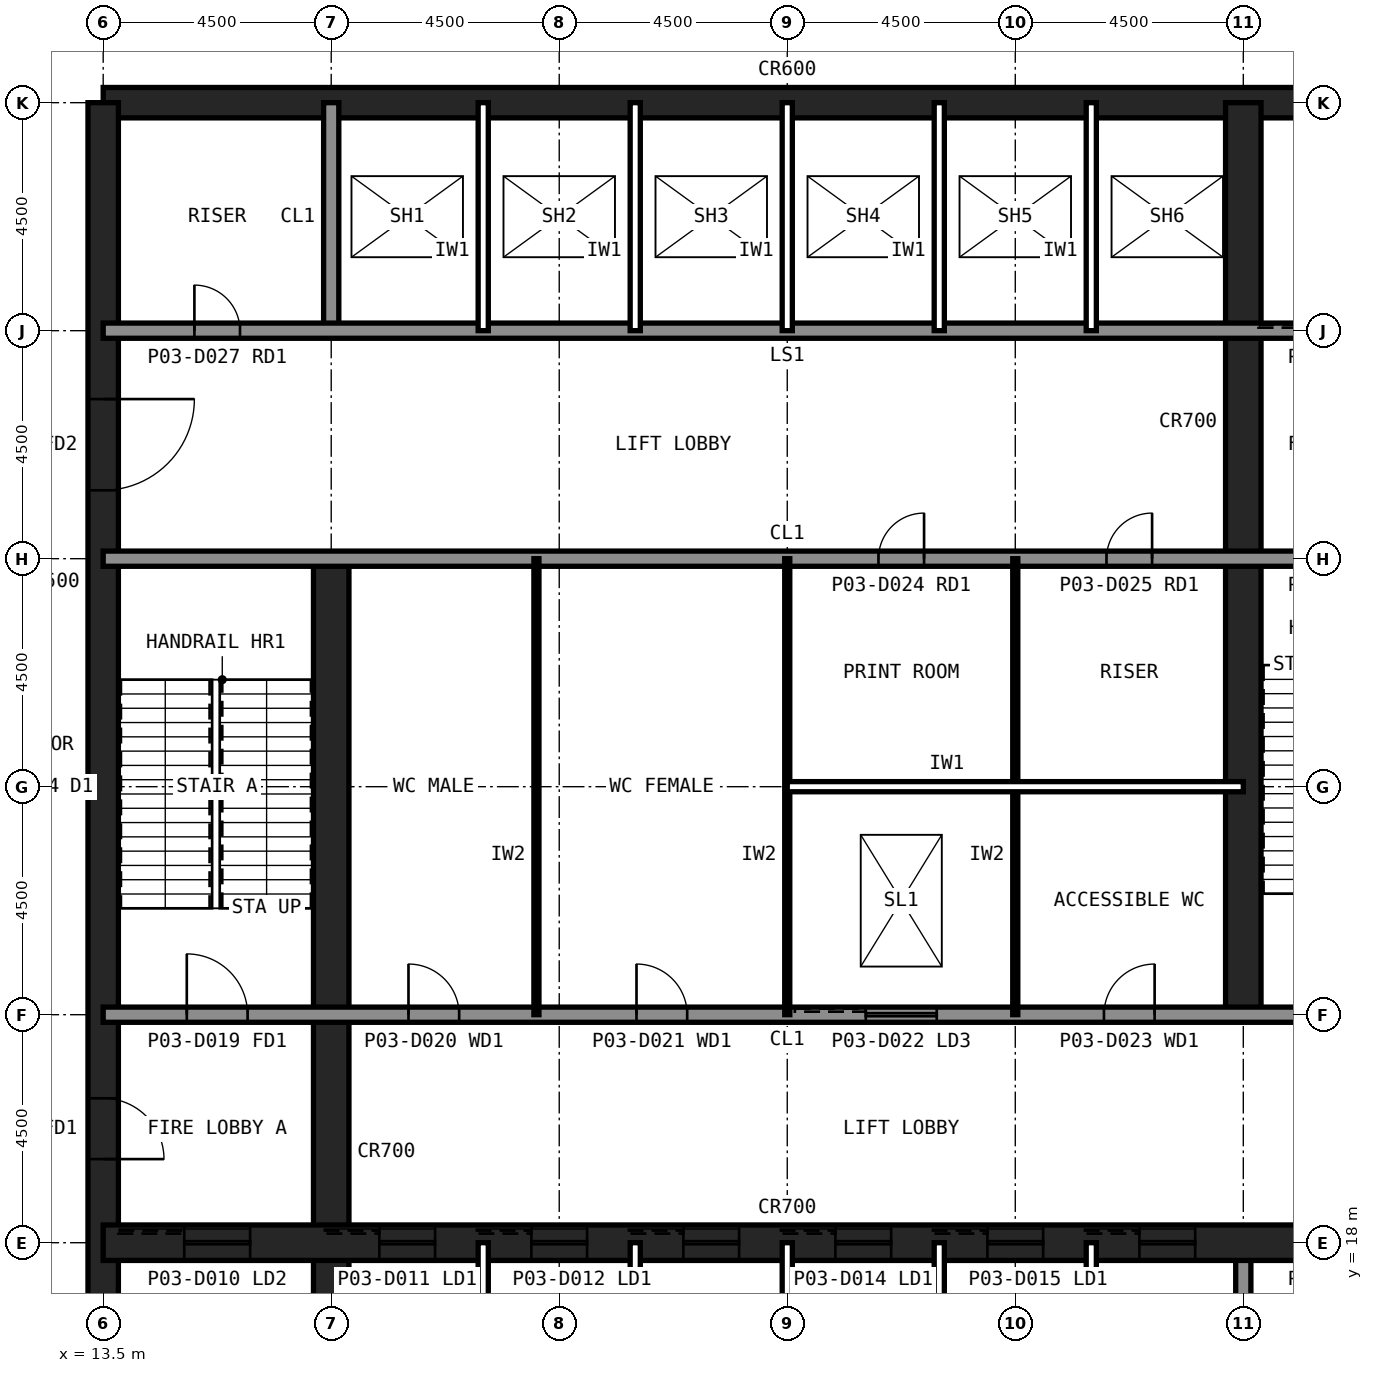
"""IFC4 building model, lengths in metres.
Left out: names, types, materials, properties, quantities, classifications, styles, units other than length and angle.
Written with IfcOpenShell. Run it as: python <this file> out.ifc"""

import sys

from ifc_helpers import new_model, si_unit, direction, frame, frame_2d, origin, place, context, subcontext, project, spatial, rectangle, extrude, element, fill, save


model = new_model("IFC4")
c1 = context("Model", 3, precision=1e-05, world=origin(), true_north=direction((0.0, 1.0)))
c2 = subcontext(c1, "Body", "Model", "MODEL_VIEW")
j1 = project(units=[si_unit("LENGTHUNIT", "METRE"), si_unit("PLANEANGLEUNIT", "RADIAN")], contexts=[c1])
p1 = place(None, origin())
s1 = spatial("IfcSite", under=j1, at=p1, CompositionType="ELEMENT")
p2 = place(p1, origin())
s2 = spatial("IfcBuilding", under=s1, at=p2, CompositionType="ELEMENT")
p3 = place(p2, frame((0.0, 0.0, 12.0)))
s3 = spatial("IfcBuildingStorey", under=s2, at=p3, CompositionType="ELEMENT", Elevation=12.0)
p4 = place(p3, frame((40.5, 40.5, 0.0), z_axis=(0.0, 0.0, 1.0), x_axis=(-1.0, 0.0, 0.0)))
e1 = element("IfcWall", 1, at=p4, inside=s3, PredefinedType="SHEAR", context=c2, shape_type="SweptSolid", body=[
    extrude(rectangle(XDim=27.0, YDim=0.6, at=frame_2d((13.5, 0.0))), origin(), (0.0, 0.0, 1.0), 6.0),
])
p5 = place(p3, frame((13.5, 40.5, 0.0), z_axis=(0.0, 0.0, 1.0), x_axis=(0.0, -1.0, 0.0)))
e2 = element("IfcWall", 2, at=p5, inside=s3, PredefinedType="SHEAR", context=c2, shape_type="SweptSolid", body=[
    extrude(rectangle(XDim=27.0, YDim=0.6, at=frame_2d((13.5, 0.0))), origin(), (0.0, 0.0, 1.0), 6.0),
])
p6 = place(p5, frame((19.65, 0.0, 0.0)))
e3 = element("IfcOpeningElement", 3, at=p6, cuts=e2, PredefinedType="OPENING", context=c2, shape_type="SweptSolid", body=[
    extrude(rectangle(XDim=1.2, YDim=2.1, at=frame_2d((0.6, 1.05))), frame((0.0, 0.31, 0.0), z_axis=(0.0, -1.0, 0.0), x_axis=(1.0, 0.0, 0.0)), (0.0, 0.0, 1.0), 0.62),
])
p7 = place(p5, frame((5.85, 0.0, 0.0)))
e4 = element("IfcOpeningElement", 4, at=p7, cuts=e2, PredefinedType="OPENING", context=c2, shape_type="SweptSolid", body=[
    extrude(rectangle(XDim=1.8, YDim=2.1, at=frame_2d((0.9, 1.05))), frame((0.0, 0.31, 0.0), z_axis=(0.0, -1.0, 0.0), x_axis=(1.0, 0.0, 0.0)), (0.0, 0.0, 1.0), 0.62),
])
p8 = place(p3, frame((18.0, 13.5, 0.0), z_axis=(0.0, 0.0, 1.0), x_axis=(0.0, 1.0, 0.0)))
e5 = element("IfcWall", 5, at=p8, inside=s3, PredefinedType="SHEAR", context=c2, shape_type="SweptSolid", body=[
    extrude(rectangle(XDim=18.0, YDim=0.7, at=frame_2d((9.0, 0.0))), origin(), (0.0, 0.0, 1.0), 6.0),
])
for number, where, z_axis, x_axis in (
    (6, (18.0, 36.0, 0.0), (0.0, 0.0, 1.0), (0.0, 1.0, 0.0)),
    (7, (36.0, 13.5, 0.0), (0.0, 0.0, 1.0), (0.0, 1.0, 0.0)),
):
    element("IfcWall", number, at=place(p3, frame(where, z_axis=z_axis, x_axis=x_axis)), inside=s3, PredefinedType="SOLIDWALL", context=c2, shape_type="SweptSolid", body=[
        extrude(rectangle(XDim=4.5, YDim=0.3, at=frame_2d((2.25, 0.0))), origin(), (0.0, 0.0, 1.0), 5.8),
    ])
p9 = place(p3, frame((36.0, 22.5, 0.0), z_axis=(0.0, 0.0, 1.0), x_axis=(0.0, 1.0, 0.0)))
e8 = element("IfcWall", 8, at=p9, inside=s3, PredefinedType="SHEAR", context=c2, shape_type="SweptSolid", body=[
    extrude(rectangle(XDim=18.0, YDim=0.7, at=frame_2d((9.0, 0.0))), origin(), (0.0, 0.0, 1.0), 6.0),
])
p10 = place(p3, frame((13.5, 18.0, 0.0), z_axis=(0.0, 0.0, 1.0), x_axis=(1.0, 0.0, 0.0)))
e9 = element("IfcWall", 9, at=p10, inside=s3, PredefinedType="SHEAR", context=c2, shape_type="SweptSolid", body=[
    extrude(rectangle(XDim=27.0, YDim=0.7, at=frame_2d((13.5, 0.0))), origin(), (0.0, 0.0, 1.0), 6.0),
])
p11 = place(p10, frame((24.3, 0.0, 0.0)))
e10 = element("IfcOpeningElement", 10, at=p11, cuts=e9, PredefinedType="OPENING", context=c2, shape_type="SweptSolid", body=[
    extrude(rectangle(XDim=0.9, YDim=2.1, at=frame_2d((0.45, 1.05))), frame((0.0, 0.36, 0.0), z_axis=(0.0, -1.0, 0.0), x_axis=(1.0, 0.0, 0.0)), (0.0, 0.0, 1.0), 0.72),
])
p12 = place(p10, frame((5.45, 0.0, 0.0)))
e11 = element("IfcOpeningElement", 11, at=p12, cuts=e9, PredefinedType="OPENING", context=c2, shape_type="SweptSolid", body=[
    extrude(rectangle(XDim=1.1, YDim=2.1, at=frame_2d((0.55, 1.05))), frame((0.0, 0.36, 0.0), z_axis=(0.0, -1.0, 0.0), x_axis=(1.0, 0.0, 0.0)), (0.0, 0.0, 1.0), 0.72),
])
p13 = place(p10, frame((8.45, 0.0, 0.0)))
e12 = element("IfcOpeningElement", 12, at=p13, cuts=e9, PredefinedType="OPENING", context=c2, shape_type="SweptSolid", body=[
    extrude(rectangle(XDim=1.1, YDim=2.1, at=frame_2d((0.55, 1.05))), frame((0.0, 0.36, 0.0), z_axis=(0.0, -1.0, 0.0), x_axis=(1.0, 0.0, 0.0)), (0.0, 0.0, 1.0), 0.72),
])
p14 = place(p10, frame((11.45, 0.0, 0.0)))
e13 = element("IfcOpeningElement", 13, at=p14, cuts=e9, PredefinedType="OPENING", context=c2, shape_type="SweptSolid", body=[
    extrude(rectangle(XDim=1.1, YDim=2.1, at=frame_2d((0.55, 1.05))), frame((0.0, 0.36, 0.0), z_axis=(0.0, -1.0, 0.0), x_axis=(1.0, 0.0, 0.0)), (0.0, 0.0, 1.0), 0.72),
])
p15 = place(p10, frame((14.45, 0.0, 0.0)))
e14 = element("IfcOpeningElement", 14, at=p15, cuts=e9, PredefinedType="OPENING", context=c2, shape_type="SweptSolid", body=[
    extrude(rectangle(XDim=1.1, YDim=2.1, at=frame_2d((0.55, 1.05))), frame((0.0, 0.36, 0.0), z_axis=(0.0, -1.0, 0.0), x_axis=(1.0, 0.0, 0.0)), (0.0, 0.0, 1.0), 0.72),
])
p16 = place(p10, frame((17.45, 0.0, 0.0)))
e15 = element("IfcOpeningElement", 15, at=p16, cuts=e9, PredefinedType="OPENING", context=c2, shape_type="SweptSolid", body=[
    extrude(rectangle(XDim=1.1, YDim=2.1, at=frame_2d((0.55, 1.05))), frame((0.0, 0.36, 0.0), z_axis=(0.0, -1.0, 0.0), x_axis=(1.0, 0.0, 0.0)), (0.0, 0.0, 1.0), 0.72),
])
p17 = place(p10, frame((20.45, 0.0, 0.0)))
e16 = element("IfcOpeningElement", 16, at=p17, cuts=e9, PredefinedType="OPENING", context=c2, shape_type="SweptSolid", body=[
    extrude(rectangle(XDim=1.1, YDim=2.1, at=frame_2d((0.55, 1.05))), frame((0.0, 0.36, 0.0), z_axis=(0.0, -1.0, 0.0), x_axis=(1.0, 0.0, 0.0)), (0.0, 0.0, 1.0), 0.72),
])
p18 = place(p10, frame((1.6, 0.0, 0.0)))
e17 = element("IfcOpeningElement", 17, at=p18, cuts=e9, PredefinedType="OPENING", context=c2, shape_type="SweptSolid", body=[
    extrude(rectangle(XDim=1.3, YDim=2.2, at=frame_2d((0.65, 1.1))), frame((0.0, 0.36, 0.0), z_axis=(0.0, -1.0, 0.0), x_axis=(1.0, 0.0, 0.0)), (0.0, 0.0, 1.0), 0.72),
])
p19 = place(p3, frame((13.5, 36.0, 0.0), z_axis=(0.0, 0.0, 1.0), x_axis=(1.0, 0.0, 0.0)))
e18 = element("IfcWall", 18, at=p19, inside=s3, PredefinedType="SOLIDWALL", context=c2, shape_type="SweptSolid", body=[
    extrude(rectangle(XDim=27.0, YDim=0.3, at=frame_2d((13.5, 0.0))), origin(), (0.0, 0.0, 1.0), 5.8),
])
p20 = place(p19, frame((1.8, 0.0, 0.0)))
e19 = element("IfcOpeningElement", 19, at=p20, cuts=e18, PredefinedType="OPENING", context=c2, shape_type="SweptSolid", body=[
    extrude(rectangle(XDim=0.9, YDim=2.1, at=frame_2d((0.45, 1.05))), frame((0.0, 0.16, 0.0), z_axis=(0.0, -1.0, 0.0), x_axis=(1.0, 0.0, 0.0)), (0.0, 0.0, 1.0), 0.32),
])
p21 = place(p19, frame((24.1, 0.0, 0.0)))
e20 = element("IfcOpeningElement", 20, at=p21, cuts=e18, PredefinedType="OPENING", context=c2, shape_type="SweptSolid", body=[
    extrude(rectangle(XDim=1.3, YDim=2.2, at=frame_2d((0.65, 1.1))), frame((0.0, 0.16, 0.0), z_axis=(0.0, -1.0, 0.0), x_axis=(1.0, 0.0, 0.0)), (0.0, 0.0, 1.0), 0.32),
])
p22 = place(p3, frame((13.5, 22.5, 0.0), z_axis=(0.0, 0.0, 1.0), x_axis=(1.0, 0.0, 0.0)))
e21 = element("IfcWall", 21, at=p22, inside=s3, PredefinedType="SOLIDWALL", context=c2, shape_type="SweptSolid", body=[
    extrude(rectangle(XDim=27.0, YDim=0.3, at=frame_2d((13.5, 0.0))), origin(), (0.0, 0.0, 1.0), 5.8),
])
p23 = place(p22, frame((1.65, 0.0, 0.0)))
e22 = element("IfcOpeningElement", 22, at=p23, cuts=e21, PredefinedType="OPENING", context=c2, shape_type="SweptSolid", body=[
    extrude(rectangle(XDim=1.2, YDim=2.1, at=frame_2d((0.6, 1.05))), frame((0.0, 0.16, 0.0), z_axis=(0.0, -1.0, 0.0), x_axis=(1.0, 0.0, 0.0)), (0.0, 0.0, 1.0), 0.32),
])
p24 = place(p22, frame((6.025, 0.0, 0.0)))
e23 = element("IfcOpeningElement", 23, at=p24, cuts=e21, PredefinedType="OPENING", context=c2, shape_type="SweptSolid", body=[
    extrude(rectangle(XDim=1.0, YDim=2.1, at=frame_2d((0.5, 1.05))), frame((0.0, 0.16, 0.0), z_axis=(0.0, -1.0, 0.0), x_axis=(1.0, 0.0, 0.0)), (0.0, 0.0, 1.0), 0.32),
])
p25 = place(p22, frame((10.525, 0.0, 0.0)))
e24 = element("IfcOpeningElement", 24, at=p25, cuts=e21, PredefinedType="OPENING", context=c2, shape_type="SweptSolid", body=[
    extrude(rectangle(XDim=1.0, YDim=2.1, at=frame_2d((0.5, 1.05))), frame((0.0, 0.16, 0.0), z_axis=(0.0, -1.0, 0.0), x_axis=(1.0, 0.0, 0.0)), (0.0, 0.0, 1.0), 0.32),
])
p26 = place(p22, frame((19.75, 0.0, 0.0)))
e25 = element("IfcOpeningElement", 25, at=p26, cuts=e21, PredefinedType="OPENING", context=c2, shape_type="SweptSolid", body=[
    extrude(rectangle(XDim=1.0, YDim=2.1, at=frame_2d((0.5, 1.05))), frame((0.0, 0.16, 0.0), z_axis=(0.0, -1.0, 0.0), x_axis=(1.0, 0.0, 0.0)), (0.0, 0.0, 1.0), 0.32),
])
p27 = place(p22, frame((15.05, 0.0, 0.0)))
e26 = element("IfcOpeningElement", 26, at=p27, cuts=e21, PredefinedType="OPENING", context=c2, shape_type="SweptSolid", body=[
    extrude(rectangle(XDim=1.4, YDim=2.4, at=frame_2d((0.7, 1.2))), frame((0.0, 0.16, 0.0), z_axis=(0.0, -1.0, 0.0), x_axis=(1.0, 0.0, 0.0)), (0.0, 0.0, 1.0), 0.32),
])
p28 = place(p3, frame((13.5, 31.5, 0.0), z_axis=(0.0, 0.0, 1.0), x_axis=(1.0, 0.0, 0.0)))
e27 = element("IfcWall", 27, at=p28, inside=s3, PredefinedType="SOLIDWALL", context=c2, shape_type="SweptSolid", body=[
    extrude(rectangle(XDim=27.0, YDim=0.3, at=frame_2d((13.5, 0.0))), origin(), (0.0, 0.0, 1.0), 5.8),
])
p29 = place(p28, frame((24.15, 0.0, 0.0)))
e28 = element("IfcOpeningElement", 28, at=p29, cuts=e27, PredefinedType="OPENING", context=c2, shape_type="SweptSolid", body=[
    extrude(rectangle(XDim=1.2, YDim=2.1, at=frame_2d((0.6, 1.05))), frame((0.0, 0.16, 0.0), z_axis=(0.0, -1.0, 0.0), x_axis=(1.0, 0.0, 0.0)), (0.0, 0.0, 1.0), 0.32),
])
p30 = place(p28, frame((15.3, 0.0, 0.0)))
e29 = element("IfcOpeningElement", 29, at=p30, cuts=e27, PredefinedType="OPENING", context=c2, shape_type="SweptSolid", body=[
    extrude(rectangle(XDim=0.9, YDim=2.1, at=frame_2d((0.45, 1.05))), frame((0.0, 0.16, 0.0), z_axis=(0.0, -1.0, 0.0), x_axis=(1.0, 0.0, 0.0)), (0.0, 0.0, 1.0), 0.32),
])
p31 = place(p28, frame((19.8, 0.0, 0.0)))
e30 = element("IfcOpeningElement", 30, at=p31, cuts=e27, PredefinedType="OPENING", context=c2, shape_type="SweptSolid", body=[
    extrude(rectangle(XDim=0.9, YDim=2.1, at=frame_2d((0.45, 1.05))), frame((0.0, 0.16, 0.0), z_axis=(0.0, -1.0, 0.0), x_axis=(1.0, 0.0, 0.0)), (0.0, 0.0, 1.0), 0.32),
])
for number, where, z_axis, x_axis in (
    (31, (21.0, 13.5, 0.0), (0.0, 0.0, 1.0), (0.0, 1.0, 0.0)),
    (32, (21.0, 36.0, 0.0), (0.0, 0.0, 1.0), (0.0, 1.0, 0.0)),
    (33, (24.0, 13.5, 0.0), (0.0, 0.0, 1.0), (0.0, 1.0, 0.0)),
    (34, (24.0, 36.0, 0.0), (0.0, 0.0, 1.0), (0.0, 1.0, 0.0)),
    (35, (27.0, 13.5, 0.0), (0.0, 0.0, 1.0), (0.0, 1.0, 0.0)),
    (36, (27.0, 36.0, 0.0), (0.0, 0.0, 1.0), (0.0, 1.0, 0.0)),
    (37, (30.0, 13.5, 0.0), (0.0, 0.0, 1.0), (0.0, 1.0, 0.0)),
    (38, (30.0, 36.0, 0.0), (0.0, 0.0, 1.0), (0.0, 1.0, 0.0)),
    (39, (33.0, 13.5, 0.0), (0.0, 0.0, 1.0), (0.0, 1.0, 0.0)),
    (40, (33.0, 36.0, 0.0), (0.0, 0.0, 1.0), (0.0, 1.0, 0.0)),
):
    element("IfcWall", number, at=place(p3, frame(where, z_axis=z_axis, x_axis=x_axis)), inside=s3, PredefinedType="PARTITIONING", context=c2, shape_type="SweptSolid", body=[
        extrude(rectangle(XDim=4.5, YDim=0.2, at=frame_2d((2.25, 0.0))), origin(), (0.0, 0.0, 1.0), 5.8),
    ])
for number, where, z_axis, x_axis in (
    (41, (22.05, 22.5, 0.0), (0.0, 0.0, 1.0), (0.0, 1.0, 0.0)),
    (42, (27.0, 22.5, 0.0), (0.0, 0.0, 1.0), (0.0, 1.0, 0.0)),
    (43, (31.5, 22.5, 0.0), (0.0, 0.0, 1.0), (0.0, 1.0, 0.0)),
):
    element("IfcWall", number, at=place(p3, frame(where, z_axis=z_axis, x_axis=x_axis)), inside=s3, PredefinedType="PLUMBINGWALL", context=c2, shape_type="SweptSolid", body=[
        extrude(rectangle(XDim=9.0, YDim=0.1, at=frame_2d((4.5, 0.0))), origin(), (0.0, 0.0, 1.0), 5.8),
    ])
p32 = place(p3, frame((27.0, 27.0, 0.0), z_axis=(0.0, 0.0, 1.0), x_axis=(1.0, 0.0, 0.0)))
e44 = element("IfcWall", 44, at=p32, inside=s3, PredefinedType="PARTITIONING", context=c2, shape_type="SweptSolid", body=[
    extrude(rectangle(XDim=9.0, YDim=0.2, at=frame_2d((4.5, 0.0))), origin(), (0.0, 0.0, 1.0), 5.8),
])
p33 = place(p6, origin())
e45 = element("IfcDoor", 45, at=p33, inside=s3, OperationType="SINGLE_SWING_RIGHT", PredefinedType="DOOR", context=c2, shape_type="SweptSolid", body=[
    extrude(rectangle(XDim=1.2, YDim=2.1, at=frame_2d((0.6, 1.05))), frame((0.0, 0.025, 0.0), z_axis=(0.0, -1.0, 0.0), x_axis=(1.0, 0.0, 0.0)), (0.0, 0.0, 1.0), 0.05),
])
fill(e3, e45)
p34 = place(p7, origin())
e46 = element("IfcDoor", 46, at=p34, inside=s3, OperationType="SINGLE_SWING_LEFT", PredefinedType="DOOR", context=c2, shape_type="SweptSolid", body=[
    extrude(rectangle(XDim=1.8, YDim=2.1, at=frame_2d((0.9, 1.05))), frame((0.0, 0.025, 0.0), z_axis=(0.0, -1.0, 0.0), x_axis=(1.0, 0.0, 0.0)), (0.0, 0.0, 1.0), 0.05),
])
fill(e4, e46)
p35 = place(p23, origin())
e47 = element("IfcDoor", 47, at=p35, inside=s3, OperationType="SINGLE_SWING_LEFT", PredefinedType="DOOR", context=c2, shape_type="SweptSolid", body=[
    extrude(rectangle(XDim=1.2, YDim=2.1, at=frame_2d((0.6, 1.05))), frame((0.0, 0.025, 0.0), z_axis=(0.0, -1.0, 0.0), x_axis=(1.0, 0.0, 0.0)), (0.0, 0.0, 1.0), 0.05),
])
fill(e22, e47)
p36 = place(p24, origin())
e48 = element("IfcDoor", 48, at=p36, inside=s3, OperationType="SINGLE_SWING_LEFT", PredefinedType="DOOR", context=c2, shape_type="SweptSolid", body=[
    extrude(rectangle(XDim=1.0, YDim=2.1, at=frame_2d((0.5, 1.05))), frame((0.0, 0.025, 0.0), z_axis=(0.0, -1.0, 0.0), x_axis=(1.0, 0.0, 0.0)), (0.0, 0.0, 1.0), 0.05),
])
fill(e23, e48)
p37 = place(p25, origin())
e49 = element("IfcDoor", 49, at=p37, inside=s3, OperationType="SINGLE_SWING_LEFT", PredefinedType="DOOR", context=c2, shape_type="SweptSolid", body=[
    extrude(rectangle(XDim=1.0, YDim=2.1, at=frame_2d((0.5, 1.05))), frame((0.0, 0.025, 0.0), z_axis=(0.0, -1.0, 0.0), x_axis=(1.0, 0.0, 0.0)), (0.0, 0.0, 1.0), 0.05),
])
fill(e24, e49)
p38 = place(p26, origin())
e50 = element("IfcDoor", 50, at=p38, inside=s3, OperationType="SINGLE_SWING_RIGHT", PredefinedType="DOOR", context=c2, shape_type="SweptSolid", body=[
    extrude(rectangle(XDim=1.0, YDim=2.1, at=frame_2d((0.5, 1.05))), frame((0.0, 0.025, 0.0), z_axis=(0.0, -1.0, 0.0), x_axis=(1.0, 0.0, 0.0)), (0.0, 0.0, 1.0), 0.05),
])
fill(e25, e50)
p39 = place(p30, origin())
e51 = element("IfcDoor", 51, at=p39, inside=s3, OperationType="SINGLE_SWING_RIGHT", PredefinedType="DOOR", context=c2, shape_type="SweptSolid", body=[
    extrude(rectangle(XDim=0.9, YDim=2.1, at=frame_2d((0.45, 1.05))), frame((0.0, 0.025, 0.0), z_axis=(0.0, -1.0, 0.0), x_axis=(1.0, 0.0, 0.0)), (0.0, 0.0, 1.0), 0.05),
])
fill(e29, e51)
p40 = place(p31, origin())
e52 = element("IfcDoor", 52, at=p40, inside=s3, OperationType="SINGLE_SWING_RIGHT", PredefinedType="DOOR", context=c2, shape_type="SweptSolid", body=[
    extrude(rectangle(XDim=0.9, YDim=2.1, at=frame_2d((0.45, 1.05))), frame((0.0, 0.025, 0.0), z_axis=(0.0, -1.0, 0.0), x_axis=(1.0, 0.0, 0.0)), (0.0, 0.0, 1.0), 0.05),
])
fill(e30, e52)
p41 = place(p20, origin())
e53 = element("IfcDoor", 53, at=p41, inside=s3, OperationType="SINGLE_SWING_LEFT", PredefinedType="DOOR", context=c2, shape_type="SweptSolid", body=[
    extrude(rectangle(XDim=0.9, YDim=2.1, at=frame_2d((0.45, 1.05))), frame((0.0, 0.025, 0.0), z_axis=(0.0, -1.0, 0.0), x_axis=(1.0, 0.0, 0.0)), (0.0, 0.0, 1.0), 0.05),
])
fill(e19, e53)
p42 = place(p12, origin())
e54 = element("IfcDoor", 54, at=p42, inside=s3, OperationType="SLIDING_TO_LEFT", PredefinedType="DOOR", context=c2, shape_type="SweptSolid", body=[
    extrude(rectangle(XDim=1.1, YDim=2.1, at=frame_2d((0.55, 1.05))), frame((0.0, 0.025, 0.0), z_axis=(0.0, -1.0, 0.0), x_axis=(1.0, 0.0, 0.0)), (0.0, 0.0, 1.0), 0.05),
])
fill(e11, e54)
p43 = place(p13, origin())
e55 = element("IfcDoor", 55, at=p43, inside=s3, OperationType="SLIDING_TO_LEFT", PredefinedType="DOOR", context=c2, shape_type="SweptSolid", body=[
    extrude(rectangle(XDim=1.1, YDim=2.1, at=frame_2d((0.55, 1.05))), frame((0.0, 0.025, 0.0), z_axis=(0.0, -1.0, 0.0), x_axis=(1.0, 0.0, 0.0)), (0.0, 0.0, 1.0), 0.05),
])
fill(e12, e55)
p44 = place(p14, origin())
e56 = element("IfcDoor", 56, at=p44, inside=s3, OperationType="SLIDING_TO_LEFT", PredefinedType="DOOR", context=c2, shape_type="SweptSolid", body=[
    extrude(rectangle(XDim=1.1, YDim=2.1, at=frame_2d((0.55, 1.05))), frame((0.0, 0.025, 0.0), z_axis=(0.0, -1.0, 0.0), x_axis=(1.0, 0.0, 0.0)), (0.0, 0.0, 1.0), 0.05),
])
fill(e13, e56)
p45 = place(p15, origin())
e57 = element("IfcDoor", 57, at=p45, inside=s3, OperationType="SLIDING_TO_LEFT", PredefinedType="DOOR", context=c2, shape_type="SweptSolid", body=[
    extrude(rectangle(XDim=1.1, YDim=2.1, at=frame_2d((0.55, 1.05))), frame((0.0, 0.025, 0.0), z_axis=(0.0, -1.0, 0.0), x_axis=(1.0, 0.0, 0.0)), (0.0, 0.0, 1.0), 0.05),
])
fill(e14, e57)
p46 = place(p16, origin())
e58 = element("IfcDoor", 58, at=p46, inside=s3, OperationType="SLIDING_TO_LEFT", PredefinedType="DOOR", context=c2, shape_type="SweptSolid", body=[
    extrude(rectangle(XDim=1.1, YDim=2.1, at=frame_2d((0.55, 1.05))), frame((0.0, 0.025, 0.0), z_axis=(0.0, -1.0, 0.0), x_axis=(1.0, 0.0, 0.0)), (0.0, 0.0, 1.0), 0.05),
])
fill(e15, e58)
p47 = place(p17, origin())
e59 = element("IfcDoor", 59, at=p47, inside=s3, OperationType="SLIDING_TO_LEFT", PredefinedType="DOOR", context=c2, shape_type="SweptSolid", body=[
    extrude(rectangle(XDim=1.1, YDim=2.1, at=frame_2d((0.55, 1.05))), frame((0.0, 0.025, 0.0), z_axis=(0.0, -1.0, 0.0), x_axis=(1.0, 0.0, 0.0)), (0.0, 0.0, 1.0), 0.05),
])
fill(e16, e59)
p48 = place(p18, origin())
e60 = element("IfcDoor", 60, at=p48, inside=s3, OperationType="SLIDING_TO_LEFT", PredefinedType="DOOR", context=c2, shape_type="SweptSolid", body=[
    extrude(rectangle(XDim=1.3, YDim=2.2, at=frame_2d((0.65, 1.1))), frame((0.0, 0.025, 0.0), z_axis=(0.0, -1.0, 0.0), x_axis=(1.0, 0.0, 0.0)), (0.0, 0.0, 1.0), 0.05),
])
fill(e17, e60)
p49 = place(p27, origin())
e61 = element("IfcDoor", 61, at=p49, inside=s3, OperationType="SLIDING_TO_LEFT", PredefinedType="DOOR", context=c2, shape_type="SweptSolid", body=[
    extrude(rectangle(XDim=1.4, YDim=2.4, at=frame_2d((0.7, 1.2))), frame((0.0, 0.025, 0.0), z_axis=(0.0, -1.0, 0.0), x_axis=(1.0, 0.0, 0.0)), (0.0, 0.0, 1.0), 0.05),
])
fill(e26, e61)
save(model, sys.argv[1])
